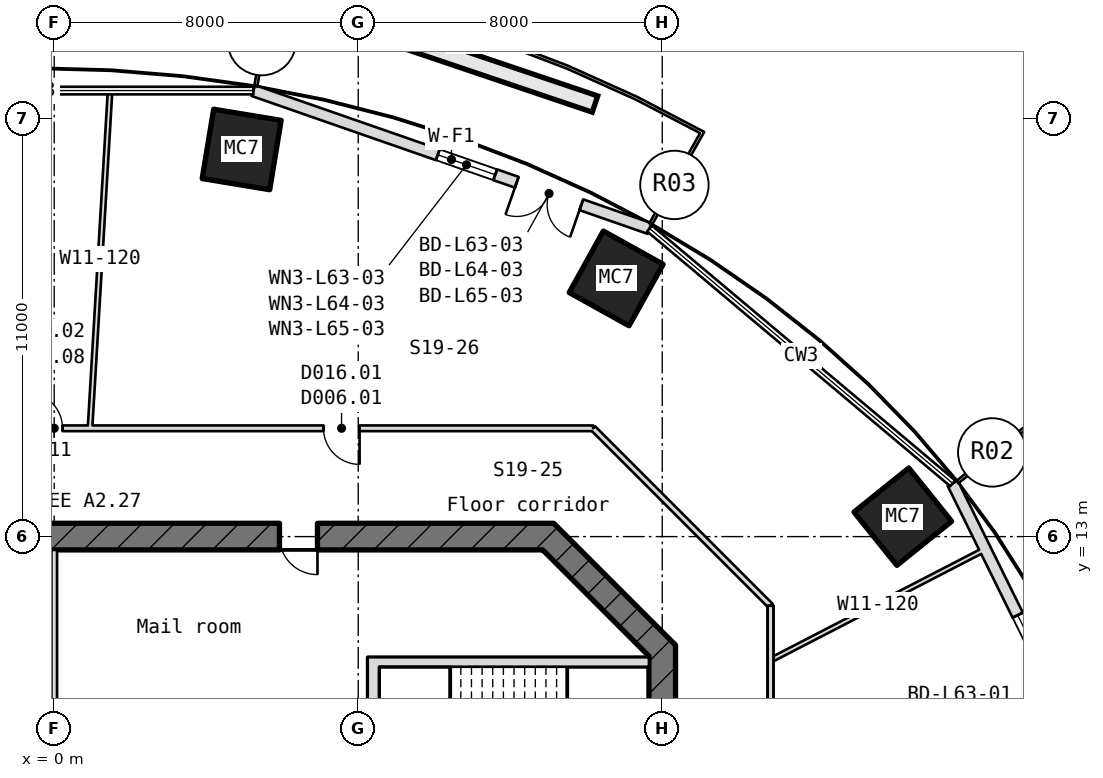
"""IFC4 building model, lengths in metres.
Left out: names, types, materials, properties, quantities, classifications, styles, units other than length and angle.
Written with IfcOpenShell. Run it as: python <this file> out.ifc"""

import sys

from ifc_helpers import new_model, si_unit, direction, frame, frame_2d, origin, origin_2d, place, context, subcontext, project, spatial, rectangle, hollow_rectangle, extrude, element, fill, save


model = new_model("IFC4")
c1 = context("Model", 3, precision=1e-05, world=origin(), true_north=direction((0.0, 1.0)))
c2 = subcontext(c1, "Body", "Model", "MODEL_VIEW")
j1 = project(units=[si_unit("LENGTHUNIT", "METRE"), si_unit("PLANEANGLEUNIT", "RADIAN")], contexts=[c1])
p1 = place(None, origin())
s1 = spatial("IfcSite", under=j1, at=p1, CompositionType="ELEMENT")
p2 = place(p1, origin())
s2 = spatial("IfcBuilding", under=s1, at=p2, CompositionType="ELEMENT")
p3 = place(p2, frame((0.0, 0.0, 284.5)))
s3 = spatial("IfcBuildingStorey", under=s2, at=p3, CompositionType="ELEMENT", Elevation=284.5)
for number, where, z_axis, x_axis in (
    (1, (22.331, 13.524, -0.18), (0.0, 0.0, 1.0), (0.627, -0.779, 0.0)),
    (2, (14.788, 19.793, -0.18), (0.0, 0.0, 1.0), (0.874, -0.486, 0.0)),
    (3, (4.933, 23.186, -0.18), (0.0, 0.0, 1.0), (0.987, -0.163, 0.0)),
):
    element("IfcColumn", number, at=place(p3, frame(where, z_axis=z_axis, x_axis=x_axis)), inside=s3, PredefinedType="COLUMN", context=c2, shape_type="SweptSolid", body=[
        extrude(hollow_rectangle(XDim=1.8, YDim=1.85, WallThickness=0.06, at=origin_2d()), origin(), (0.0, 0.0, 1.0), 4.15),
    ])
p4 = place(p3, frame((27.962, 5.641, 0.0), z_axis=(0.0, 0.0, 1.0), x_axis=(-0.442107110685, 0.8969622638, 0.0)))
e4 = element("IfcWall", 4, at=p4, inside=s3, PredefinedType="SOLIDWALL", context=c2, shape_type="SweptSolid", body=[
    extrude(rectangle(XDim=9.767, YDim=0.3, at=frame_2d((4.884, 0.0))), origin(), (0.0, 0.0, 1.0), 3.97),
])
p5 = place(p4, frame((1.9, 0.0, 0.0)))
e5 = element("IfcOpeningElement", 5, at=p5, cuts=e4, PredefinedType="OPENING", context=c2, shape_type="SweptSolid", body=[
    extrude(rectangle(XDim=1.8, YDim=2.4, at=frame_2d((0.9, 1.2))), frame((0.0, 0.16, 0.0), z_axis=(0.0, -1.0, 0.0), x_axis=(1.0, 0.0, 0.0)), (0.0, 0.0, 1.0), 0.32),
])
p6 = place(p4, frame((4.3, 0.0, 0.9)))
e6 = element("IfcOpeningElement", 6, at=p6, cuts=e4, PredefinedType="OPENING", context=c2, shape_type="SweptSolid", body=[
    extrude(rectangle(XDim=1.6, YDim=1.5, at=frame_2d((0.8, 0.75))), frame((0.0, 0.16, 0.0), z_axis=(0.0, -1.0, 0.0), x_axis=(1.0, 0.0, 0.0)), (0.0, 0.0, 1.0), 0.32),
])
p7 = place(p3, frame((15.666, 21.107, 0.0), z_axis=(0.0, 0.0, 1.0), x_axis=(-0.94441082719, 0.328767683155, 0.0)))
e7 = element("IfcWall", 7, at=p7, inside=s3, PredefinedType="SOLIDWALL", context=c2, shape_type="SweptSolid", body=[
    extrude(rectangle(XDim=11.038, YDim=0.3, at=frame_2d((5.519, 0.0))), origin(), (0.0, 0.0, 1.0), 3.97),
])
p8 = place(p7, frame((1.9, 0.0, 0.0)))
e8 = element("IfcOpeningElement", 8, at=p8, cuts=e7, PredefinedType="OPENING", context=c2, shape_type="SweptSolid", body=[
    extrude(rectangle(XDim=1.8, YDim=2.4, at=frame_2d((0.9, 1.2))), frame((0.0, 0.16, 0.0), z_axis=(0.0, -1.0, 0.0), x_axis=(1.0, 0.0, 0.0)), (0.0, 0.0, 1.0), 0.32),
])
p9 = place(p7, frame((4.3, 0.0, 0.9)))
e9 = element("IfcOpeningElement", 9, at=p9, cuts=e7, PredefinedType="OPENING", context=c2, shape_type="SweptSolid", body=[
    extrude(rectangle(XDim=1.6, YDim=1.5, at=frame_2d((0.8, 0.75))), frame((0.0, 0.16, 0.0), z_axis=(0.0, -1.0, 0.0), x_axis=(1.0, 0.0, 0.0)), (0.0, 0.0, 1.0), 0.32),
])
p10 = place(p3, frame((16.0, -10.145, -0.18), z_axis=(0.0, 0.0, 1.0), x_axis=(0.0, 1.0, 0.0)))
e10 = element("IfcWall", 10, at=p10, inside=s3, PredefinedType="SHEAR", context=c2, shape_type="SweptSolid", body=[
    extrude(rectangle(XDim=20.29, YDim=0.7, at=frame_2d((10.145, 0.0))), origin(), (0.0, 0.0, 1.0), 4.15),
])
p11 = place(p10, frame((8.945, 0.0, 0.18)))
e11 = element("IfcOpeningElement", 11, at=p11, cuts=e10, PredefinedType="OPENING", context=c2, shape_type="SweptSolid", body=[
    extrude(rectangle(XDim=2.4, YDim=2.1, at=frame_2d((1.2, 1.05))), frame((0.0, 0.36, 0.0), z_axis=(0.0, -1.0, 0.0), x_axis=(1.0, 0.0, 0.0)), (0.0, 0.0, 1.0), 0.72),
])
p12 = place(p10, frame((13.545, 0.0, 0.18)))
e12 = element("IfcOpeningElement", 12, at=p12, cuts=e10, PredefinedType="OPENING", context=c2, shape_type="SweptSolid", body=[
    extrude(rectangle(XDim=1.2, YDim=2.1, at=frame_2d((0.6, 1.05))), frame((0.0, 0.36, 0.0), z_axis=(0.0, -1.0, 0.0), x_axis=(1.0, 0.0, 0.0)), (0.0, 0.0, 1.0), 0.72),
])
p13 = place(p10, frame((3.545, 0.0, 0.18)))
e13 = element("IfcOpeningElement", 13, at=p13, cuts=e10, PredefinedType="OPENING", context=c2, shape_type="SweptSolid", body=[
    extrude(rectangle(XDim=1.2, YDim=2.1, at=frame_2d((0.6, 1.05))), frame((0.0, 0.36, 0.0), z_axis=(0.0, -1.0, 0.0), x_axis=(1.0, 0.0, 0.0)), (0.0, 0.0, 1.0), 0.72),
])
p14 = place(p3, frame((16.103, 9.897, -0.18), z_axis=(0.0, 0.0, 1.0), x_axis=(-0.707106781187, 0.707106781187, 0.0)))
e14 = element("IfcWall", 14, at=p14, inside=s3, PredefinedType="SHEAR", context=c2, shape_type="SweptSolid", body=[
    extrude(rectangle(XDim=4.533, YDim=0.7, at=frame_2d((2.266, 0.0))), origin(), (0.0, 0.0, 1.0), 4.15),
])
p15 = place(p3, frame((13.145, 13.0, -0.18), z_axis=(0.0, 0.0, 1.0), x_axis=(-1.0, 0.0, 0.0)))
e15 = element("IfcWall", 15, at=p15, inside=s3, PredefinedType="SHEAR", context=c2, shape_type="SweptSolid", body=[
    extrude(rectangle(XDim=26.29, YDim=0.7, at=frame_2d((13.145, 0.0))), origin(), (0.0, 0.0, 1.0), 4.15),
])
p16 = place(p15, frame((19.073, 0.0, 0.18)))
e16 = element("IfcOpeningElement", 16, at=p16, cuts=e15, PredefinedType="OPENING", context=c2, shape_type="SweptSolid", body=[
    extrude(rectangle(XDim=1.0, YDim=2.1, at=frame_2d((0.5, 1.05))), frame((0.0, 0.36, 0.0), z_axis=(0.0, -1.0, 0.0), x_axis=(1.0, 0.0, 0.0)), (0.0, 0.0, 1.0), 0.72),
])
p17 = place(p15, frame((6.217, 0.0, 0.18)))
e17 = element("IfcOpeningElement", 17, at=p17, cuts=e15, PredefinedType="OPENING", context=c2, shape_type="SweptSolid", body=[
    extrude(rectangle(XDim=1.0, YDim=2.1, at=frame_2d((0.5, 1.05))), frame((0.0, 0.36, 0.0), z_axis=(0.0, -1.0, 0.0), x_axis=(1.0, 0.0, 0.0)), (0.0, 0.0, 1.0), 0.72),
])
p18 = place(p3, frame((8.55, 9.7, -0.18), z_axis=(0.0, 0.0, 1.0), x_axis=(1.0, 0.0, 0.0)))
e18 = element("IfcWall", 18, at=p18, inside=s3, PredefinedType="SHEAR", context=c2, shape_type="SweptSolid", body=[
    extrude(rectangle(XDim=7.1, YDim=0.25, at=frame_2d((3.55, 0.0))), origin(), (0.0, 0.0, 1.0), 4.15),
])
p19 = place(p3, frame((0.0, 8.46, 0.0), z_axis=(0.0, 0.0, 1.0), x_axis=(0.0, 1.0, 0.0)))
e19 = element("IfcWall", 19, at=p19, inside=s3, PredefinedType="PARTITIONING", context=c2, shape_type="SweptSolid", body=[
    extrude(rectangle(XDim=4.19, YDim=0.15, at=frame_2d((2.095, 0.0))), origin(), (0.0, 0.0, 1.0), 3.97),
])
p20 = place(p3, frame((8.4, 8.35, -0.18), z_axis=(0.0, 0.0, 1.0), x_axis=(0.0, 1.0, 0.0)))
e20 = element("IfcWall", 20, at=p20, inside=s3, PredefinedType="SHEAR", context=c2, shape_type="SweptSolid", body=[
    extrude(rectangle(XDim=1.475, YDim=0.3, at=frame_2d((0.737, 0.0))), origin(), (0.0, 0.0, 1.0), 4.15),
])
p21 = place(p3, frame((-14.18, 15.85, 0.0), z_axis=(0.0, 0.0, 1.0), x_axis=(1.0, 0.0, 0.0)))
e21 = element("IfcWall", 21, at=p21, inside=s3, PredefinedType="PARTITIONING", context=c2, shape_type="SweptSolid", body=[
    extrude(rectangle(XDim=28.361, YDim=0.15, at=frame_2d((14.18, 0.0))), origin(), (0.0, 0.0, 1.0), 3.97),
])
p22 = place(p21, frame((21.267, 0.0, 0.0)))
e22 = element("IfcOpeningElement", 22, at=p22, cuts=e21, PredefinedType="OPENING", context=c2, shape_type="SweptSolid", body=[
    extrude(rectangle(XDim=0.95, YDim=2.1, at=frame_2d((0.475, 1.05))), frame((0.0, 0.085, 0.0), z_axis=(0.0, -1.0, 0.0), x_axis=(1.0, 0.0, 0.0)), (0.0, 0.0, 1.0), 0.17),
])
p23 = place(p21, frame((13.449, 0.0, 0.0)))
e23 = element("IfcOpeningElement", 23, at=p23, cuts=e21, PredefinedType="OPENING", context=c2, shape_type="SweptSolid", body=[
    extrude(rectangle(XDim=0.95, YDim=2.1, at=frame_2d((0.475, 1.05))), frame((0.0, 0.085, 0.0), z_axis=(0.0, -1.0, 0.0), x_axis=(1.0, 0.0, 0.0)), (0.0, 0.0, 1.0), 0.17),
])
p24 = place(p21, frame((9.655, 0.0, 0.0)))
e24 = element("IfcOpeningElement", 24, at=p24, cuts=e21, PredefinedType="OPENING", context=c2, shape_type="SweptSolid", body=[
    extrude(rectangle(XDim=0.95, YDim=2.1, at=frame_2d((0.475, 1.05))), frame((0.0, 0.085, 0.0), z_axis=(0.0, -1.0, 0.0), x_axis=(1.0, 0.0, 0.0)), (0.0, 0.0, 1.0), 0.17),
])
p25 = place(p21, frame((5.315, 0.0, 0.0)))
e25 = element("IfcOpeningElement", 25, at=p25, cuts=e21, PredefinedType="OPENING", context=c2, shape_type="SweptSolid", body=[
    extrude(rectangle(XDim=0.95, YDim=2.1, at=frame_2d((0.475, 1.05))), frame((0.0, 0.085, 0.0), z_axis=(0.0, -1.0, 0.0), x_axis=(1.0, 0.0, 0.0)), (0.0, 0.0, 1.0), 0.17),
])
p26 = place(p21, frame((1.547, 0.0, 0.0)))
e26 = element("IfcOpeningElement", 26, at=p26, cuts=e21, PredefinedType="OPENING", context=c2, shape_type="SweptSolid", body=[
    extrude(rectangle(XDim=0.95, YDim=2.1, at=frame_2d((0.475, 1.05))), frame((0.0, 0.085, 0.0), z_axis=(0.0, -1.0, 0.0), x_axis=(1.0, 0.0, 0.0)), (0.0, 0.0, 1.0), 0.17),
])
p27 = place(p3, frame((0.942, 15.85, 0.0), z_axis=(0.0, 0.0, 1.0), x_axis=(0.059350641377, 0.998237196947, 0.0)))
e27 = element("IfcWall", 27, at=p27, inside=s3, PredefinedType="PARTITIONING", context=c2, shape_type="SweptSolid", body=[
    extrude(rectangle(XDim=8.902, YDim=0.12, at=frame_2d((4.451, 0.0))), origin(), (0.0, 0.0, 1.0), 3.97),
])
p28 = place(p3, frame((14.18, 15.85, 0.0), z_axis=(0.0, 0.0, 1.0), x_axis=(0.707106781187, -0.707106781187, 0.0)))
e28 = element("IfcWall", 28, at=p28, inside=s3, PredefinedType="PARTITIONING", context=c2, shape_type="SweptSolid", body=[
    extrude(rectangle(XDim=6.604, YDim=0.15, at=frame_2d((3.302, 0.0))), origin(), (0.0, 0.0, 1.0), 3.97),
])
p29 = place(p3, frame((18.85, 9.747, 0.0), z_axis=(0.0, 0.0, 1.0), x_axis=(0.888271654615, 0.459318481675, 0.0)))
e29 = element("IfcWall", 29, at=p29, inside=s3, PredefinedType="PARTITIONING", context=c2, shape_type="SweptSolid", body=[
    extrude(rectangle(XDim=6.36, YDim=0.12, at=frame_2d((3.18, 0.0))), origin(), (0.0, 0.0, 1.0), 3.97),
])
p30 = place(p3, frame((18.85, 11.18, 0.0), z_axis=(0.0, 0.0, 1.0), x_axis=(0.0, -1.0, 0.0)))
e30 = element("IfcWall", 30, at=p30, inside=s3, PredefinedType="PARTITIONING", context=c2, shape_type="SweptSolid", body=[
    extrude(rectangle(XDim=22.361, YDim=0.15, at=frame_2d((11.18, 0.0))), origin(), (0.0, 0.0, 1.0), 3.97),
])
p31 = place(p30, frame((9.175, 0.0, 0.0)))
e31 = element("IfcOpeningElement", 31, at=p31, cuts=e30, PredefinedType="OPENING", context=c2, shape_type="SweptSolid", body=[
    extrude(rectangle(XDim=0.95, YDim=2.1, at=frame_2d((0.475, 1.05))), frame((0.0, 0.085, 0.0), z_axis=(0.0, -1.0, 0.0), x_axis=(1.0, 0.0, 0.0)), (0.0, 0.0, 1.0), 0.17),
])
p32 = place(p6, origin())
e32 = element("IfcWindow", 32, at=p32, inside=s3, PartitioningType="SINGLE_PANEL", PredefinedType="WINDOW", context=c2, shape_type="SweptSolid", body=[
    extrude(rectangle(XDim=1.6, YDim=1.5, at=frame_2d((0.8, 0.75))), frame((0.0, 0.03, 0.0), z_axis=(0.0, -1.0, 0.0), x_axis=(1.0, 0.0, 0.0)), (0.0, 0.0, 1.0), 0.06),
])
fill(e6, e32)
p33 = place(p8, origin())
e33 = element("IfcDoor", 33, at=p33, inside=s3, OperationType="SINGLE_SWING_LEFT", PredefinedType="DOOR", context=c2, shape_type="SweptSolid", body=[
    extrude(rectangle(XDim=1.8, YDim=2.4, at=frame_2d((0.9, 1.2))), frame((0.0, 0.025, 0.0), z_axis=(0.0, -1.0, 0.0), x_axis=(1.0, 0.0, 0.0)), (0.0, 0.0, 1.0), 0.05),
])
fill(e8, e33)
p34 = place(p9, origin())
e34 = element("IfcWindow", 34, at=p34, inside=s3, PartitioningType="SINGLE_PANEL", PredefinedType="WINDOW", context=c2, shape_type="SweptSolid", body=[
    extrude(rectangle(XDim=1.6, YDim=1.5, at=frame_2d((0.8, 0.75))), frame((0.0, 0.03, 0.0), z_axis=(0.0, -1.0, 0.0), x_axis=(1.0, 0.0, 0.0)), (0.0, 0.0, 1.0), 0.06),
])
fill(e9, e34)
p35 = place(p17, origin())
e35 = element("IfcDoor", 35, at=p35, inside=s3, OperationType="SINGLE_SWING_RIGHT", PredefinedType="DOOR", context=c2, shape_type="SweptSolid", body=[
    extrude(rectangle(XDim=1.0, YDim=2.1, at=frame_2d((0.5, 1.05))), frame((0.0, 0.025, 0.0), z_axis=(0.0, -1.0, 0.0), x_axis=(1.0, 0.0, 0.0)), (0.0, 0.0, 1.0), 0.05),
])
fill(e17, e35)
p36 = place(p22, frame((0.95, 0.0, 0.0), z_axis=(0.0, 0.0, 1.0), x_axis=(-1.0, 0.0, 0.0)))
e36 = element("IfcDoor", 36, at=p36, inside=s3, OperationType="SINGLE_SWING_LEFT", PredefinedType="DOOR", context=c2, shape_type="SweptSolid", body=[
    extrude(rectangle(XDim=0.95, YDim=2.1, at=frame_2d((0.475, 1.05))), frame((0.0, 0.025, 0.0), z_axis=(0.0, -1.0, 0.0), x_axis=(1.0, 0.0, 0.0)), (0.0, 0.0, 1.0), 0.05),
])
fill(e22, e36)
p37 = place(p23, origin())
e37 = element("IfcDoor", 37, at=p37, inside=s3, OperationType="SINGLE_SWING_RIGHT", PredefinedType="DOOR", context=c2, shape_type="SweptSolid", body=[
    extrude(rectangle(XDim=0.95, YDim=2.1, at=frame_2d((0.475, 1.05))), frame((0.0, 0.025, 0.0), z_axis=(0.0, -1.0, 0.0), x_axis=(1.0, 0.0, 0.0)), (0.0, 0.0, 1.0), 0.05),
])
fill(e23, e37)
save(model, sys.argv[1])
